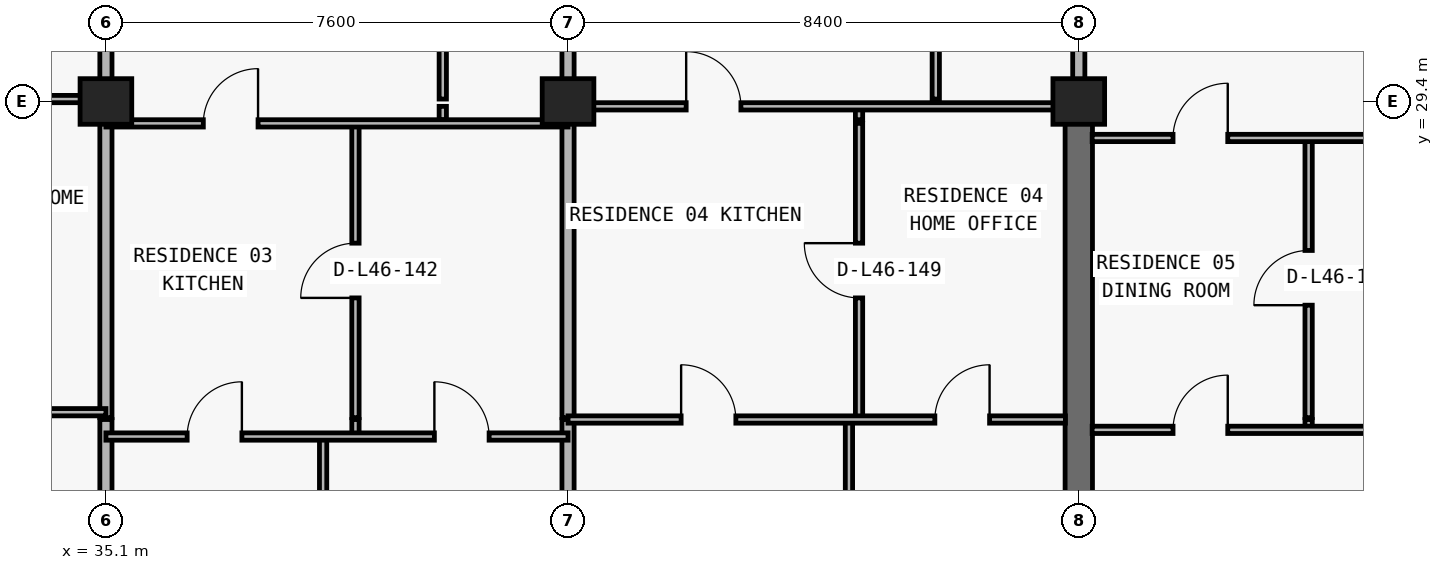
"""IFC4 building model, lengths in metres.
Left out: names, types, materials, properties, quantities, classifications, styles, units other than length and angle.
Written with IfcOpenShell. Run it as: python <this file> out.ifc"""

import sys

from ifc_helpers import new_model, si_unit, direction, frame, frame_2d, origin, origin_2d, place, context, subcontext, project, spatial, rectangle, extrude, element, fill, save


model = new_model("IFC4")
c1 = context("Model", 3, precision=1e-05, world=origin(), true_north=direction((0.0, 1.0)))
c2 = subcontext(c1, "Body", "Model", "MODEL_VIEW")
j1 = project(units=[si_unit("LENGTHUNIT", "METRE"), si_unit("PLANEANGLEUNIT", "RADIAN")], contexts=[c1])
p1 = place(None, origin())
s1 = spatial("IfcSite", under=j1, at=p1, CompositionType="ELEMENT")
p2 = place(p1, origin())
s2 = spatial("IfcBuilding", under=s1, at=p2, CompositionType="ELEMENT")
p3 = place(p2, frame((0.0, 0.0, 167.1)))
s3 = spatial("IfcBuildingStorey", under=s2, at=p3, CompositionType="ELEMENT", Elevation=167.1)
for number, where, z_axis, x_axis in (
    (1, (35.1, 29.4, 0.0), (0.0, 0.0, 1.0), (1.0, 0.0, 0.0)),
    (2, (42.7, 29.4, 0.0), (0.0, 0.0, 1.0), (1.0, 0.0, 0.0)),
    (3, (51.1, 29.4, 0.0), (0.0, 0.0, 1.0), (1.0, 0.0, 0.0)),
):
    element("IfcColumn", number, at=place(p3, frame(where, z_axis=z_axis, x_axis=x_axis)), inside=s3, PredefinedType="COLUMN", context=c2, shape_type="SweptSolid", body=[
        extrude(rectangle(XDim=0.85, YDim=0.75, at=origin_2d()), origin(), (0.0, 0.0, 1.0), 3.05),
    ])
p4 = place(p3, frame((51.1, 20.8, 0.0), z_axis=(0.0, 0.0, 1.0), x_axis=(0.0, 1.0, 0.0)))
e4 = element("IfcWall", 4, at=p4, inside=s3, PredefinedType="SHEAR", context=c2, shape_type="SweptSolid", body=[
    extrude(rectangle(XDim=8.6, YDim=0.45, at=frame_2d((4.3, 0.0))), origin(), (0.0, 0.0, 1.0), 3.05),
])
p5 = place(p3, frame((35.1, 11.24, 0.0), z_axis=(0.0, 0.0, 1.0), x_axis=(0.0, 1.0, 0.0)))
e5 = element("IfcWall", 5, at=p5, inside=s3, PredefinedType="PARTITIONING", context=c2, shape_type="SweptSolid", body=[
    extrude(rectangle(XDim=12.93, YDim=0.2, at=frame_2d((6.465, 0.0))), origin(), (0.0, 0.0, 1.0), 2.263),
])
p6 = place(p3, frame((35.1, 24.2, 0.0), z_axis=(0.0, 0.0, 1.0), x_axis=(0.0, 1.0, 0.0)))
e6 = element("IfcWall", 6, at=p6, inside=s3, PredefinedType="PARTITIONING", context=c2, shape_type="SweptSolid", body=[
    extrude(rectangle(XDim=4.84, YDim=0.2, at=frame_2d((2.42, 0.0))), origin(), (0.0, 0.0, 1.0), 2.263),
])
p7 = place(p3, frame((35.1, 29.1, 0.0), z_axis=(0.0, 0.0, 1.0), x_axis=(0.0, 1.0, 0.0)))
e7 = element("IfcWall", 7, at=p7, inside=s3, PredefinedType="PARTITIONING", context=c2, shape_type="SweptSolid", body=[
    extrude(rectangle(XDim=0.22, YDim=0.2, at=frame_2d((0.11, 0.0))), origin(), (0.0, 0.0, 1.0), 3.05),
])
p8 = place(p3, frame((35.1, 29.44, 0.0), z_axis=(0.0, 0.0, 1.0), x_axis=(0.0, 1.0, 0.0)))
e8 = element("IfcWall", 8, at=p8, inside=s3, PredefinedType="PARTITIONING", context=c2, shape_type="SweptSolid", body=[
    extrude(rectangle(XDim=4.26, YDim=0.2, at=frame_2d((2.13, 0.0))), origin(), (0.0, 0.0, 1.0), 2.263),
])
p9 = place(p3, frame((38.672, 11.24, 0.0), z_axis=(0.0, 0.0, 1.0), x_axis=(0.0, 1.0, 0.0)))
e9 = element("IfcWall", 9, at=p9, inside=s3, PredefinedType="PARTITIONING", context=c2, shape_type="SweptSolid", body=[
    extrude(rectangle(XDim=12.65, YDim=0.12, at=frame_2d((6.325, 0.0))), origin(), (0.0, 0.0, 1.0), 3.05),
])
p10 = place(p3, frame((39.204, 23.89, 0.0), z_axis=(0.0, 0.0, 1.0), x_axis=(0.0, 1.0, 0.0)))
e10 = element("IfcWall", 10, at=p10, inside=s3, PredefinedType="PARTITIONING", context=c2, shape_type="SweptSolid", body=[
    extrude(rectangle(XDim=0.28, YDim=0.12, at=frame_2d((0.14, 0.0))), origin(), (0.0, 0.0, 1.0), 3.05),
])
p11 = place(p3, frame((39.204, 24.2, 0.0), z_axis=(0.0, 0.0, 1.0), x_axis=(0.0, 1.0, 0.0)))
e11 = element("IfcWall", 11, at=p11, inside=s3, PredefinedType="PARTITIONING", context=c2, shape_type="SweptSolid", body=[
    extrude(rectangle(XDim=4.84, YDim=0.12, at=frame_2d((2.42, 0.0))), origin(), (0.0, 0.0, 1.0), 3.05),
])
p12 = place(p11, frame((1.97, 0.0, 0.0)))
e12 = element("IfcOpeningElement", 12, at=p12, cuts=e11, PredefinedType="OPENING", context=c2, shape_type="SweptSolid", body=[
    extrude(rectangle(XDim=0.9, YDim=2.15, at=frame_2d((0.45, 1.075))), frame((0.0, 0.07, 0.0), z_axis=(0.0, -1.0, 0.0), x_axis=(1.0, 0.0, 0.0)), (0.0, 0.0, 1.0), 0.14),
])
p13 = place(p3, frame((40.64, 29.1, 0.0), z_axis=(0.0, 0.0, 1.0), x_axis=(0.0, 1.0, 0.0)))
e13 = element("IfcWall", 13, at=p13, inside=s3, PredefinedType="PARTITIONING", context=c2, shape_type="SweptSolid", body=[
    extrude(rectangle(XDim=0.22, YDim=0.12, at=frame_2d((0.11, 0.0))), origin(), (0.0, 0.0, 1.0), 2.725),
])
p14 = place(p3, frame((40.64, 29.44, 0.0), z_axis=(0.0, 0.0, 1.0), x_axis=(0.0, 1.0, 0.0)))
e14 = element("IfcWall", 14, at=p14, inside=s3, PredefinedType="PARTITIONING", context=c2, shape_type="SweptSolid", body=[
    extrude(rectangle(XDim=4.26, YDim=0.12, at=frame_2d((2.13, 0.0))), origin(), (0.0, 0.0, 1.0), 3.05),
])
p15 = place(p14, frame((1.705, 0.0, 0.0)))
e15 = element("IfcOpeningElement", 15, at=p15, cuts=e14, PredefinedType="OPENING", context=c2, shape_type="SweptSolid", body=[
    extrude(rectangle(XDim=0.85, YDim=2.1, at=frame_2d((0.425, 1.05))), frame((0.0, 0.07, 0.0), z_axis=(0.0, -1.0, 0.0), x_axis=(1.0, 0.0, 0.0)), (0.0, 0.0, 1.0), 0.14),
])
p16 = place(p3, frame((42.7, 11.24, 0.0), z_axis=(0.0, 0.0, 1.0), x_axis=(0.0, 1.0, 0.0)))
e16 = element("IfcWall", 16, at=p16, inside=s3, PredefinedType="PARTITIONING", context=c2, shape_type="SweptSolid", body=[
    extrude(rectangle(XDim=12.93, YDim=0.2, at=frame_2d((6.465, 0.0))), origin(), (0.0, 0.0, 1.0), 2.263),
])
p17 = place(p3, frame((42.7, 24.2, 0.0), z_axis=(0.0, 0.0, 1.0), x_axis=(0.0, 1.0, 0.0)))
e17 = element("IfcWall", 17, at=p17, inside=s3, PredefinedType="PARTITIONING", context=c2, shape_type="SweptSolid", body=[
    extrude(rectangle(XDim=4.84, YDim=0.2, at=frame_2d((2.42, 0.0))), origin(), (0.0, 0.0, 1.0), 2.263),
])
p18 = place(p3, frame((42.7, 29.1, 0.0), z_axis=(0.0, 0.0, 1.0), x_axis=(0.0, 1.0, 0.0)))
e18 = element("IfcWall", 18, at=p18, inside=s3, PredefinedType="PARTITIONING", context=c2, shape_type="SweptSolid", body=[
    extrude(rectangle(XDim=0.22, YDim=0.2, at=frame_2d((0.11, 0.0))), origin(), (0.0, 0.0, 1.0), 3.05),
])
p19 = place(p3, frame((42.7, 29.44, 0.0), z_axis=(0.0, 0.0, 1.0), x_axis=(0.0, 1.0, 0.0)))
e19 = element("IfcWall", 19, at=p19, inside=s3, PredefinedType="PARTITIONING", context=c2, shape_type="SweptSolid", body=[
    extrude(rectangle(XDim=4.26, YDim=0.2, at=frame_2d((2.13, 0.0))), origin(), (0.0, 0.0, 1.0), 2.263),
])
p20 = place(p3, frame((47.32, 11.24, 0.0), z_axis=(0.0, 0.0, 1.0), x_axis=(0.0, 1.0, 0.0)))
e20 = element("IfcWall", 20, at=p20, inside=s3, PredefinedType="PARTITIONING", context=c2, shape_type="SweptSolid", body=[
    extrude(rectangle(XDim=12.93, YDim=0.12, at=frame_2d((6.465, 0.0))), origin(), (0.0, 0.0, 1.0), 3.05),
])
p21 = place(p3, frame((47.486, 24.2, 0.0), z_axis=(0.0, 0.0, 1.0), x_axis=(0.0, 1.0, 0.0)))
e21 = element("IfcWall", 21, at=p21, inside=s3, PredefinedType="PARTITIONING", context=c2, shape_type="SweptSolid", body=[
    extrude(rectangle(XDim=4.84, YDim=0.12, at=frame_2d((2.42, 0.0))), origin(), (0.0, 0.0, 1.0), 3.05),
])
p22 = place(p21, frame((1.97, 0.0, 0.0)))
e22 = element("IfcOpeningElement", 22, at=p22, cuts=e21, PredefinedType="OPENING", context=c2, shape_type="SweptSolid", body=[
    extrude(rectangle(XDim=0.9, YDim=2.15, at=frame_2d((0.45, 1.075))), frame((0.0, 0.07, 0.0), z_axis=(0.0, -1.0, 0.0), x_axis=(1.0, 0.0, 0.0)), (0.0, 0.0, 1.0), 0.14),
])
p23 = place(p3, frame((47.486, 29.1, 0.0), z_axis=(0.0, 0.0, 1.0), x_axis=(0.0, 1.0, 0.0)))
e23 = element("IfcWall", 23, at=p23, inside=s3, PredefinedType="PARTITIONING", context=c2, shape_type="SweptSolid", body=[
    extrude(rectangle(XDim=0.22, YDim=0.12, at=frame_2d((0.11, 0.0))), origin(), (0.0, 0.0, 1.0), 3.05),
])
p24 = place(p3, frame((48.748, 29.44, 0.0), z_axis=(0.0, 0.0, 1.0), x_axis=(0.0, 1.0, 0.0)))
e24 = element("IfcWall", 24, at=p24, inside=s3, PredefinedType="PARTITIONING", context=c2, shape_type="SweptSolid", body=[
    extrude(rectangle(XDim=4.26, YDim=0.12, at=frame_2d((2.13, 0.0))), origin(), (0.0, 0.0, 1.0), 3.05),
])
p25 = place(p24, frame((1.705, 0.0, 0.0)))
e25 = element("IfcOpeningElement", 25, at=p25, cuts=e24, PredefinedType="OPENING", context=c2, shape_type="SweptSolid", body=[
    extrude(rectangle(XDim=0.85, YDim=2.1, at=frame_2d((0.425, 1.05))), frame((0.0, 0.07, 0.0), z_axis=(0.0, -1.0, 0.0), x_axis=(1.0, 0.0, 0.0)), (0.0, 0.0, 1.0), 0.14),
])
p26 = place(p3, frame((51.1, 29.44, 0.0), z_axis=(0.0, 0.0, 1.0), x_axis=(0.0, 1.0, 0.0)))
e26 = element("IfcWall", 26, at=p26, inside=s3, PredefinedType="PARTITIONING", context=c2, shape_type="SweptSolid", body=[
    extrude(rectangle(XDim=4.26, YDim=0.2, at=frame_2d((2.13, 0.0))), origin(), (0.0, 0.0, 1.0), 2.335),
])
p27 = place(p3, frame((54.88, 24.0, 0.0), z_axis=(0.0, 0.0, 1.0), x_axis=(0.0, 1.0, 0.0)))
e27 = element("IfcWall", 27, at=p27, inside=s3, PredefinedType="PARTITIONING", context=c2, shape_type="SweptSolid", body=[
    extrude(rectangle(XDim=0.17, YDim=0.12, at=frame_2d((0.085, 0.0))), origin(), (0.0, 0.0, 1.0), 3.05),
])
p28 = place(p3, frame((54.88, 24.2, 0.0), z_axis=(0.0, 0.0, 1.0), x_axis=(0.0, 1.0, 0.0)))
e28 = element("IfcWall", 28, at=p28, inside=s3, PredefinedType="PARTITIONING", context=c2, shape_type="SweptSolid", body=[
    extrude(rectangle(XDim=4.6, YDim=0.12, at=frame_2d((2.3, 0.0))), origin(), (0.0, 0.0, 1.0), 3.05),
])
p29 = place(p28, frame((1.85, 0.0, 0.0)))
e29 = element("IfcOpeningElement", 29, at=p29, cuts=e28, PredefinedType="OPENING", context=c2, shape_type="SweptSolid", body=[
    extrude(rectangle(XDim=0.9, YDim=2.15, at=frame_2d((0.45, 1.075))), frame((0.0, 0.07, 0.0), z_axis=(0.0, -1.0, 0.0), x_axis=(1.0, 0.0, 0.0)), (0.0, 0.0, 1.0), 0.14),
])
p30 = place(p3, frame((35.1, 23.89, 0.0), z_axis=(0.0, 0.0, 1.0), x_axis=(1.0, 0.0, 0.0)))
e30 = element("IfcWall", 30, at=p30, inside=s3, PredefinedType="PARTITIONING", context=c2, shape_type="SweptSolid", body=[
    extrude(rectangle(XDim=7.6, YDim=0.12, at=frame_2d((3.8, 0.0))), origin(), (0.0, 0.0, 1.0), 3.05),
])
p31 = place(p30, frame((1.336, 0.0, 0.0)))
e31 = element("IfcOpeningElement", 31, at=p31, cuts=e30, PredefinedType="OPENING", context=c2, shape_type="SweptSolid", body=[
    extrude(rectangle(XDim=0.9, YDim=2.15, at=frame_2d((0.45, 1.075))), frame((0.0, 0.07, 0.0), z_axis=(0.0, -1.0, 0.0), x_axis=(1.0, 0.0, 0.0)), (0.0, 0.0, 1.0), 0.14),
])
p32 = place(p30, frame((5.402, 0.0, 0.0)))
e32 = element("IfcOpeningElement", 32, at=p32, cuts=e30, PredefinedType="OPENING", context=c2, shape_type="SweptSolid", body=[
    extrude(rectangle(XDim=0.9, YDim=2.15, at=frame_2d((0.45, 1.075))), frame((0.0, 0.07, 0.0), z_axis=(0.0, -1.0, 0.0), x_axis=(1.0, 0.0, 0.0)), (0.0, 0.0, 1.0), 0.14),
])
p33 = place(p3, frame((51.32, 24.0, 0.0), z_axis=(0.0, 0.0, 1.0), x_axis=(1.0, 0.0, 0.0)))
e33 = element("IfcWall", 33, at=p33, inside=s3, PredefinedType="PARTITIONING", context=c2, shape_type="SweptSolid", body=[
    extrude(rectangle(XDim=8.18, YDim=0.12, at=frame_2d((4.09, 0.0))), origin(), (0.0, 0.0, 1.0), 3.05),
])
p34 = place(p33, frame((1.33, 0.0, 0.0)))
e34 = element("IfcOpeningElement", 34, at=p34, cuts=e33, PredefinedType="OPENING", context=c2, shape_type="SweptSolid", body=[
    extrude(rectangle(XDim=0.9, YDim=2.15, at=frame_2d((0.45, 1.075))), frame((0.0, 0.07, 0.0), z_axis=(0.0, -1.0, 0.0), x_axis=(1.0, 0.0, 0.0)), (0.0, 0.0, 1.0), 0.14),
])
p35 = place(p3, frame((42.7, 24.17, 0.0), z_axis=(0.0, 0.0, 1.0), x_axis=(1.0, 0.0, 0.0)))
e35 = element("IfcWall", 35, at=p35, inside=s3, PredefinedType="PARTITIONING", context=c2, shape_type="SweptSolid", body=[
    extrude(rectangle(XDim=8.18, YDim=0.12, at=frame_2d((4.09, 0.0))), origin(), (0.0, 0.0, 1.0), 3.05),
])
p36 = place(p35, frame((1.86, 0.0, 0.0)))
e36 = element("IfcOpeningElement", 36, at=p36, cuts=e35, PredefinedType="OPENING", context=c2, shape_type="SweptSolid", body=[
    extrude(rectangle(XDim=0.9, YDim=2.15, at=frame_2d((0.45, 1.075))), frame((0.0, 0.07, 0.0), z_axis=(0.0, -1.0, 0.0), x_axis=(1.0, 0.0, 0.0)), (0.0, 0.0, 1.0), 0.14),
])
p37 = place(p35, frame((6.033, 0.0, 0.0)))
e37 = element("IfcOpeningElement", 37, at=p37, cuts=e35, PredefinedType="OPENING", context=c2, shape_type="SweptSolid", body=[
    extrude(rectangle(XDim=0.9, YDim=2.15, at=frame_2d((0.45, 1.075))), frame((0.0, 0.07, 0.0), z_axis=(0.0, -1.0, 0.0), x_axis=(1.0, 0.0, 0.0)), (0.0, 0.0, 1.0), 0.14),
])
p38 = place(p3, frame((31.4, 24.29, 0.0), z_axis=(0.0, 0.0, 1.0), x_axis=(1.0, 0.0, 0.0)))
e38 = element("IfcWall", 38, at=p38, inside=s3, PredefinedType="PARTITIONING", context=c2, shape_type="SweptSolid", body=[
    extrude(rectangle(XDim=3.7, YDim=0.12, at=frame_2d((1.85, 0.0))), origin(), (0.0, 0.0, 1.0), 3.05),
])
p39 = place(p38, frame((1.4, 0.0, 0.0)))
e39 = element("IfcOpeningElement", 39, at=p39, cuts=e38, PredefinedType="OPENING", context=c2, shape_type="SweptSolid", body=[
    extrude(rectangle(XDim=0.9, YDim=2.15, at=frame_2d((0.45, 1.075))), frame((0.0, 0.07, 0.0), z_axis=(0.0, -1.0, 0.0), x_axis=(1.0, 0.0, 0.0)), (0.0, 0.0, 1.0), 0.14),
])
p40 = place(p3, frame((51.32, 28.8, 0.0), z_axis=(0.0, 0.0, 1.0), x_axis=(1.0, 0.0, 0.0)))
e40 = element("IfcWall", 40, at=p40, inside=s3, PredefinedType="PARTITIONING", context=c2, shape_type="SweptSolid", body=[
    extrude(rectangle(XDim=8.18, YDim=0.12, at=frame_2d((4.09, 0.0))), origin(), (0.0, 0.0, 1.0), 3.05),
])
p41 = place(p40, frame((1.33, 0.0, 0.0)))
e41 = element("IfcOpeningElement", 41, at=p41, cuts=e40, PredefinedType="OPENING", context=c2, shape_type="SweptSolid", body=[
    extrude(rectangle(XDim=0.9, YDim=2.15, at=frame_2d((0.45, 1.075))), frame((0.0, 0.07, 0.0), z_axis=(0.0, -1.0, 0.0), x_axis=(1.0, 0.0, 0.0)), (0.0, 0.0, 1.0), 0.14),
])
p42 = place(p3, frame((35.1, 29.04, 0.0), z_axis=(0.0, 0.0, 1.0), x_axis=(1.0, 0.0, 0.0)))
e42 = element("IfcWall", 42, at=p42, inside=s3, PredefinedType="PARTITIONING", context=c2, shape_type="SweptSolid", body=[
    extrude(rectangle(XDim=7.6, YDim=0.12, at=frame_2d((3.8, 0.0))), origin(), (0.0, 0.0, 1.0), 3.05),
])
p43 = place(p42, frame((1.602, 0.0, 0.0)))
e43 = element("IfcOpeningElement", 43, at=p43, cuts=e42, PredefinedType="OPENING", context=c2, shape_type="SweptSolid", body=[
    extrude(rectangle(XDim=0.9, YDim=2.15, at=frame_2d((0.45, 1.075))), frame((0.0, 0.07, 0.0), z_axis=(0.0, -1.0, 0.0), x_axis=(1.0, 0.0, 0.0)), (0.0, 0.0, 1.0), 0.14),
])
p44 = place(p3, frame((42.7, 29.32, 0.0), z_axis=(0.0, 0.0, 1.0), x_axis=(1.0, 0.0, 0.0)))
e44 = element("IfcWall", 44, at=p44, inside=s3, PredefinedType="PARTITIONING", context=c2, shape_type="SweptSolid", body=[
    extrude(rectangle(XDim=8.18, YDim=0.12, at=frame_2d((4.09, 0.0))), origin(), (0.0, 0.0, 1.0), 2.263),
])
p45 = place(p44, frame((1.943, 0.0, 0.0)))
e45 = element("IfcOpeningElement", 45, at=p45, cuts=e44, PredefinedType="OPENING", context=c2, shape_type="SweptSolid", body=[
    extrude(rectangle(XDim=0.9, YDim=2.15, at=frame_2d((0.45, 1.075))), frame((0.0, 0.07, 0.0), z_axis=(0.0, -1.0, 0.0), x_axis=(1.0, 0.0, 0.0)), (0.0, 0.0, 1.0), 0.14),
])
p46 = place(p3, frame((31.4, 29.44, 0.0), z_axis=(0.0, 0.0, 1.0), x_axis=(1.0, 0.0, 0.0)))
e46 = element("IfcWall", 46, at=p46, inside=s3, PredefinedType="PARTITIONING", context=c2, shape_type="SweptSolid", body=[
    extrude(rectangle(XDim=3.7, YDim=0.12, at=frame_2d((1.85, 0.0))), origin(), (0.0, 0.0, 1.0), 2.263),
])
p47 = place(p43, origin())
e47 = element("IfcDoor", 47, at=p47, inside=s3, OperationType="SINGLE_SWING_RIGHT", PredefinedType="DOOR", context=c2, shape_type="SweptSolid", body=[
    extrude(rectangle(XDim=0.9, YDim=2.15, at=frame_2d((0.45, 1.075))), frame((0.0, 0.025, 0.0), z_axis=(0.0, -1.0, 0.0), x_axis=(1.0, 0.0, 0.0)), (0.0, 0.0, 1.0), 0.05),
])
fill(e43, e47)
p48 = place(p12, origin())
e48 = element("IfcDoor", 48, at=p48, inside=s3, OperationType="SINGLE_SWING_LEFT", PredefinedType="DOOR", context=c2, shape_type="SweptSolid", body=[
    extrude(rectangle(XDim=0.9, YDim=2.15, at=frame_2d((0.45, 1.075))), frame((0.0, 0.025, 0.0), z_axis=(0.0, -1.0, 0.0), x_axis=(1.0, 0.0, 0.0)), (0.0, 0.0, 1.0), 0.05),
])
fill(e12, e48)
p49 = place(p31, origin())
e49 = element("IfcDoor", 49, at=p49, inside=s3, OperationType="SINGLE_SWING_RIGHT", PredefinedType="DOOR", context=c2, shape_type="SweptSolid", body=[
    extrude(rectangle(XDim=0.9, YDim=2.15, at=frame_2d((0.45, 1.075))), frame((0.0, 0.025, 0.0), z_axis=(0.0, -1.0, 0.0), x_axis=(1.0, 0.0, 0.0)), (0.0, 0.0, 1.0), 0.05),
])
fill(e31, e49)
p50 = place(p32, origin())
e50 = element("IfcDoor", 50, at=p50, inside=s3, OperationType="SINGLE_SWING_LEFT", PredefinedType="DOOR", context=c2, shape_type="SweptSolid", body=[
    extrude(rectangle(XDim=0.9, YDim=2.15, at=frame_2d((0.45, 1.075))), frame((0.0, 0.025, 0.0), z_axis=(0.0, -1.0, 0.0), x_axis=(1.0, 0.0, 0.0)), (0.0, 0.0, 1.0), 0.05),
])
fill(e32, e50)
p51 = place(p45, origin())
e51 = element("IfcDoor", 51, at=p51, inside=s3, OperationType="SINGLE_SWING_LEFT", PredefinedType="DOOR", context=c2, shape_type="SweptSolid", body=[
    extrude(rectangle(XDim=0.9, YDim=2.15, at=frame_2d((0.45, 1.075))), frame((0.0, 0.025, 0.0), z_axis=(0.0, -1.0, 0.0), x_axis=(1.0, 0.0, 0.0)), (0.0, 0.0, 1.0), 0.05),
])
fill(e45, e51)
p52 = place(p22, origin())
e52 = element("IfcDoor", 52, at=p52, inside=s3, OperationType="SINGLE_SWING_RIGHT", PredefinedType="DOOR", context=c2, shape_type="SweptSolid", body=[
    extrude(rectangle(XDim=0.9, YDim=2.15, at=frame_2d((0.45, 1.075))), frame((0.0, 0.025, 0.0), z_axis=(0.0, -1.0, 0.0), x_axis=(1.0, 0.0, 0.0)), (0.0, 0.0, 1.0), 0.05),
])
fill(e22, e52)
p53 = place(p36, origin())
e53 = element("IfcDoor", 53, at=p53, inside=s3, OperationType="SINGLE_SWING_LEFT", PredefinedType="DOOR", context=c2, shape_type="SweptSolid", body=[
    extrude(rectangle(XDim=0.9, YDim=2.15, at=frame_2d((0.45, 1.075))), frame((0.0, 0.025, 0.0), z_axis=(0.0, -1.0, 0.0), x_axis=(1.0, 0.0, 0.0)), (0.0, 0.0, 1.0), 0.05),
])
fill(e36, e53)
p54 = place(p37, origin())
e54 = element("IfcDoor", 54, at=p54, inside=s3, OperationType="SINGLE_SWING_RIGHT", PredefinedType="DOOR", context=c2, shape_type="SweptSolid", body=[
    extrude(rectangle(XDim=0.9, YDim=2.15, at=frame_2d((0.45, 1.075))), frame((0.0, 0.025, 0.0), z_axis=(0.0, -1.0, 0.0), x_axis=(1.0, 0.0, 0.0)), (0.0, 0.0, 1.0), 0.05),
])
fill(e37, e54)
p55 = place(p41, origin())
e55 = element("IfcDoor", 55, at=p55, inside=s3, OperationType="SINGLE_SWING_RIGHT", PredefinedType="DOOR", context=c2, shape_type="SweptSolid", body=[
    extrude(rectangle(XDim=0.9, YDim=2.15, at=frame_2d((0.45, 1.075))), frame((0.0, 0.025, 0.0), z_axis=(0.0, -1.0, 0.0), x_axis=(1.0, 0.0, 0.0)), (0.0, 0.0, 1.0), 0.05),
])
fill(e41, e55)
p56 = place(p29, origin())
e56 = element("IfcDoor", 56, at=p56, inside=s3, OperationType="SINGLE_SWING_LEFT", PredefinedType="DOOR", context=c2, shape_type="SweptSolid", body=[
    extrude(rectangle(XDim=0.9, YDim=2.15, at=frame_2d((0.45, 1.075))), frame((0.0, 0.025, 0.0), z_axis=(0.0, -1.0, 0.0), x_axis=(1.0, 0.0, 0.0)), (0.0, 0.0, 1.0), 0.05),
])
fill(e29, e56)
p57 = place(p34, origin())
e57 = element("IfcDoor", 57, at=p57, inside=s3, OperationType="SINGLE_SWING_RIGHT", PredefinedType="DOOR", context=c2, shape_type="SweptSolid", body=[
    extrude(rectangle(XDim=0.9, YDim=2.15, at=frame_2d((0.45, 1.075))), frame((0.0, 0.025, 0.0), z_axis=(0.0, -1.0, 0.0), x_axis=(1.0, 0.0, 0.0)), (0.0, 0.0, 1.0), 0.05),
])
fill(e34, e57)
save(model, sys.argv[1])
